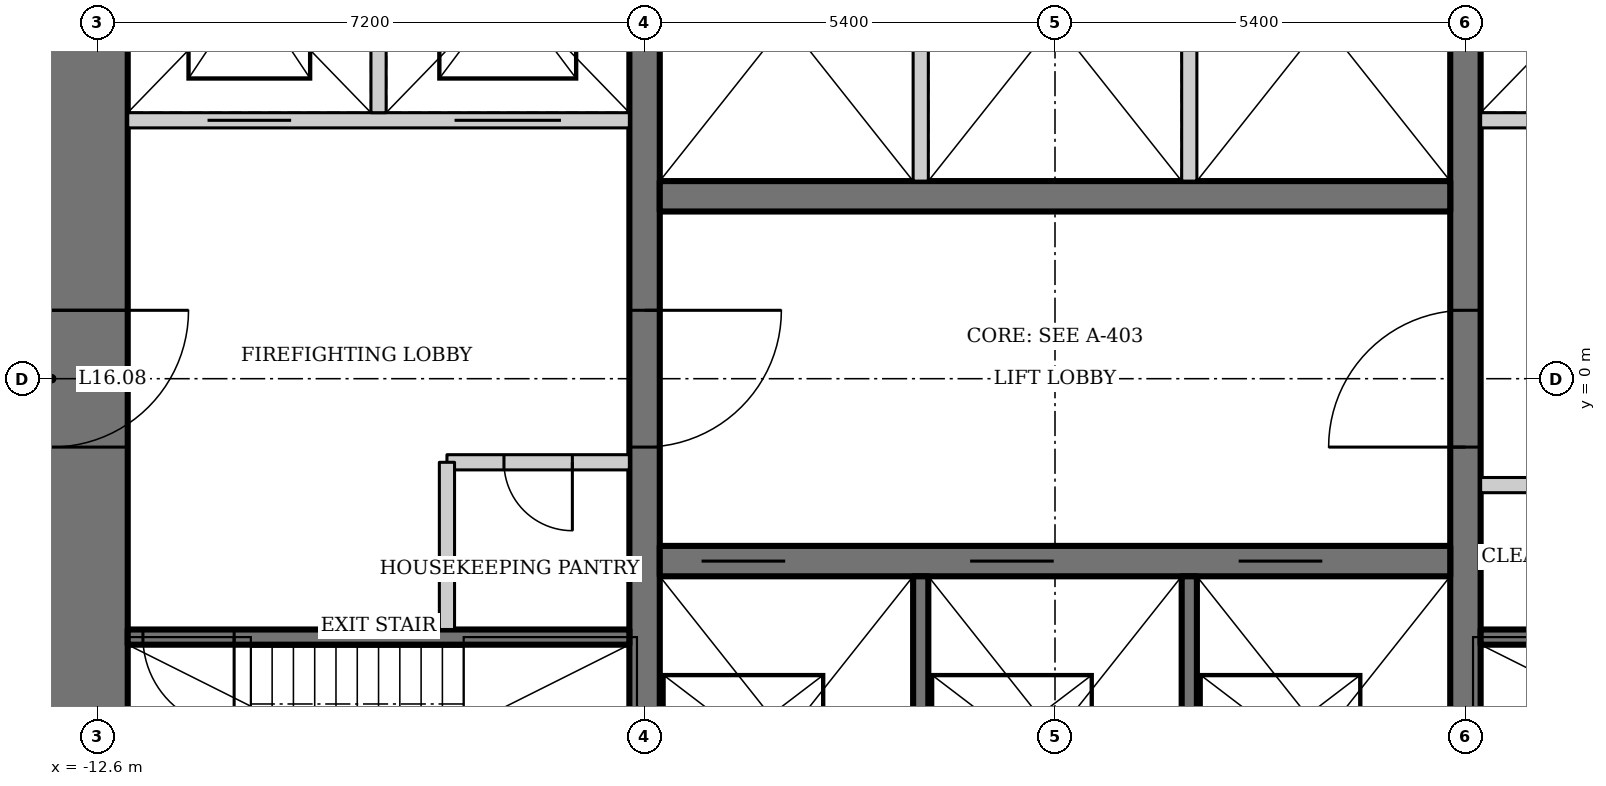
"""IFC4 building model, lengths in metres.
Left out: names, types, materials, properties, quantities, classifications, styles, units other than length and angle.
Written with IfcOpenShell. Run it as: python <this file> out.ifc"""

import sys

from ifc_helpers import new_model, si_unit, direction, frame, frame_2d, origin, place, context, subcontext, project, spatial, rectangle, extrude, element, fill, save


model = new_model("IFC4")
c1 = context("Model", 3, precision=1e-05, world=origin(), true_north=direction((0.0, 1.0)))
c2 = subcontext(c1, "Body", "Model", "MODEL_VIEW")
j1 = project(units=[si_unit("LENGTHUNIT", "METRE"), si_unit("PLANEANGLEUNIT", "RADIAN")], contexts=[c1])
p1 = place(None, origin())
s1 = spatial("IfcSite", under=j1, at=p1, CompositionType="ELEMENT")
p2 = place(p1, origin())
s2 = spatial("IfcBuilding", under=s1, at=p2, CompositionType="ELEMENT")
p3 = place(p2, frame((0.0, 0.0, 73.0)))
s3 = spatial("IfcBuildingStorey", under=s2, at=p3, CompositionType="ELEMENT", Elevation=73.0)
p4 = place(p3, frame((-13.2, 13.0, 0.0), z_axis=(0.0, 0.0, 1.0), x_axis=(0.0, -1.0, 0.0)))
e1 = element("IfcWall", 1, at=p4, inside=s3, PredefinedType="SHEAR", context=c2, shape_type="SweptSolid", body=[
    extrude(rectangle(XDim=26.0, YDim=2.0, at=frame_2d((13.0, 0.0))), origin(), (0.0, 0.0, 1.0), 3.6),
])
p5 = place(p4, frame((12.1, 0.0, 0.0)))
e2 = element("IfcOpeningElement", 2, at=p5, cuts=e1, PredefinedType="OPENING", context=c2, shape_type="SweptSolid", body=[
    extrude(rectangle(XDim=1.8, YDim=2.1, at=frame_2d((0.9, 1.05))), frame((0.0, 1.01, 0.0), z_axis=(0.0, -1.0, 0.0), x_axis=(1.0, 0.0, 0.0)), (0.0, 0.0, 1.0), 2.02),
])
p6 = place(p3, frame((5.4, -6.8, 0.0), z_axis=(0.0, 0.0, 1.0), x_axis=(0.0, 1.0, 0.0)))
e3 = element("IfcWall", 3, at=p6, inside=s3, PredefinedType="SHEAR", context=c2, shape_type="SweptSolid", body=[
    extrude(rectangle(XDim=13.6, YDim=0.4, at=frame_2d((6.8, 0.0))), origin(), (0.0, 0.0, 1.0), 3.6),
])
p7 = place(p6, frame((5.9, 0.0, 0.0)))
e4 = element("IfcOpeningElement", 4, at=p7, cuts=e3, PredefinedType="OPENING", context=c2, shape_type="SweptSolid", body=[
    extrude(rectangle(XDim=1.8, YDim=2.1, at=frame_2d((0.9, 1.05))), frame((0.0, 0.21, 0.0), z_axis=(0.0, -1.0, 0.0), x_axis=(1.0, 0.0, 0.0)), (0.0, 0.0, 1.0), 0.42),
])
p8 = place(p3, frame((-5.4, 6.8, 0.0), z_axis=(0.0, 0.0, 1.0), x_axis=(0.0, -1.0, 0.0)))
e5 = element("IfcWall", 5, at=p8, inside=s3, PredefinedType="SHEAR", context=c2, shape_type="SweptSolid", body=[
    extrude(rectangle(XDim=13.6, YDim=0.4, at=frame_2d((6.8, 0.0))), origin(), (0.0, 0.0, 1.0), 3.6),
])
p9 = place(p8, frame((5.9, 0.0, 0.0)))
e6 = element("IfcOpeningElement", 6, at=p9, cuts=e5, PredefinedType="OPENING", context=c2, shape_type="SweptSolid", body=[
    extrude(rectangle(XDim=1.8, YDim=2.1, at=frame_2d((0.9, 1.05))), frame((0.0, 0.21, 0.0), z_axis=(0.0, -1.0, 0.0), x_axis=(1.0, 0.0, 0.0)), (0.0, 0.0, 1.0), 0.42),
])
p10 = place(p3, frame((-5.2, -2.4, 0.0), z_axis=(0.0, 0.0, 1.0), x_axis=(1.0, 0.0, 0.0)))
e7 = element("IfcWall", 7, at=p10, inside=s3, PredefinedType="SHEAR", context=c2, shape_type="SweptSolid", body=[
    extrude(rectangle(XDim=10.4, YDim=0.4, at=frame_2d((5.2, 0.0))), origin(), (0.0, 0.0, 1.0), 3.6),
])
p11 = place(p10, frame((0.55, 0.0, 0.0)))
e8 = element("IfcOpeningElement", 8, at=p11, cuts=e7, PredefinedType="OPENING", context=c2, shape_type="SweptSolid", body=[
    extrude(rectangle(XDim=1.1, YDim=2.2, at=frame_2d((0.55, 1.1))), frame((0.0, 0.21, 0.0), z_axis=(0.0, -1.0, 0.0), x_axis=(1.0, 0.0, 0.0)), (0.0, 0.0, 1.0), 0.42),
])
p12 = place(p10, frame((4.083, 0.0, 0.0)))
e9 = element("IfcOpeningElement", 9, at=p12, cuts=e7, PredefinedType="OPENING", context=c2, shape_type="SweptSolid", body=[
    extrude(rectangle(XDim=1.1, YDim=2.2, at=frame_2d((0.55, 1.1))), frame((0.0, 0.21, 0.0), z_axis=(0.0, -1.0, 0.0), x_axis=(1.0, 0.0, 0.0)), (0.0, 0.0, 1.0), 0.42),
])
p13 = place(p10, frame((7.617, 0.0, 0.0)))
e10 = element("IfcOpeningElement", 10, at=p13, cuts=e7, PredefinedType="OPENING", context=c2, shape_type="SweptSolid", body=[
    extrude(rectangle(XDim=1.1, YDim=2.2, at=frame_2d((0.55, 1.1))), frame((0.0, 0.21, 0.0), z_axis=(0.0, -1.0, 0.0), x_axis=(1.0, 0.0, 0.0)), (0.0, 0.0, 1.0), 0.42),
])
for number, where, z_axis, x_axis in (
    (11, (-1.767, -2.6, 0.0), (0.0, 0.0, 1.0), (0.0, -1.0, 0.0)),
    (12, (1.767, -2.6, 0.0), (0.0, 0.0, 1.0), (0.0, -1.0, 0.0)),
):
    element("IfcWall", number, at=place(p3, frame(where, z_axis=z_axis, x_axis=x_axis)), inside=s3, PredefinedType="SOLIDWALL", context=c2, shape_type="SweptSolid", body=[
        extrude(rectangle(XDim=4.2, YDim=0.2, at=frame_2d((2.1, 0.0))), origin(), (0.0, 0.0, 1.0), 3.6),
    ])
p14 = place(p3, frame((5.2, 2.4, 0.0), z_axis=(0.0, 0.0, 1.0), x_axis=(-1.0, 0.0, 0.0)))
e13 = element("IfcWall", 13, at=p14, inside=s3, PredefinedType="SHEAR", context=c2, shape_type="SweptSolid", body=[
    extrude(rectangle(XDim=10.4, YDim=0.4, at=frame_2d((5.2, 0.0))), origin(), (0.0, 0.0, 1.0), 3.6),
])
for number, where, z_axis, x_axis in (
    (14, (-1.767, 2.6, 0.0), (0.0, 0.0, 1.0), (0.0, 1.0, 0.0)),
    (15, (1.767, 2.6, 0.0), (0.0, 0.0, 1.0), (0.0, 1.0, 0.0)),
):
    element("IfcWall", number, at=place(p3, frame(where, z_axis=z_axis, x_axis=x_axis)), inside=s3, PredefinedType="SOLIDWALL", context=c2, shape_type="SweptSolid", body=[
        extrude(rectangle(XDim=4.2, YDim=0.2, at=frame_2d((2.1, 0.0))), origin(), (0.0, 0.0, 1.0), 3.6),
    ])
p15 = place(p3, frame((5.6, -3.4, 0.0), z_axis=(0.0, 0.0, 1.0), x_axis=(1.0, 0.0, 0.0)))
e16 = element("IfcWall", 16, at=p15, inside=s3, PredefinedType="SHEAR", context=c2, shape_type="SweptSolid", body=[
    extrude(rectangle(XDim=6.6, YDim=0.2, at=frame_2d((3.3, 0.0))), origin(), (0.0, 0.0, 1.0), 3.6),
])
p16 = place(p15, frame((5.2, 0.0, 0.0)))
e17 = element("IfcOpeningElement", 17, at=p16, cuts=e16, PredefinedType="OPENING", context=c2, shape_type="SweptSolid", body=[
    extrude(rectangle(XDim=1.2, YDim=2.1, at=frame_2d((0.6, 1.05))), frame((0.0, 0.11, 0.0), z_axis=(0.0, -1.0, 0.0), x_axis=(1.0, 0.0, 0.0)), (0.0, 0.0, 1.0), 0.22),
])
p17 = place(p3, frame((12.2, 3.4, 0.0), z_axis=(0.0, 0.0, 1.0), x_axis=(-1.0, 0.0, 0.0)))
e18 = element("IfcWall", 18, at=p17, inside=s3, PredefinedType="SOLIDWALL", context=c2, shape_type="SweptSolid", body=[
    extrude(rectangle(XDim=6.6, YDim=0.2, at=frame_2d((3.3, 0.0))), origin(), (0.0, 0.0, 1.0), 3.6),
])
p18 = place(p17, frame((4.45, 0.0, 0.0)))
e19 = element("IfcOpeningElement", 19, at=p18, cuts=e18, PredefinedType="OPENING", context=c2, shape_type="SweptSolid", body=[
    extrude(rectangle(XDim=1.1, YDim=2.2, at=frame_2d((0.55, 1.1))), frame((0.0, 0.11, 0.0), z_axis=(0.0, -1.0, 0.0), x_axis=(1.0, 0.0, 0.0)), (0.0, 0.0, 1.0), 0.22),
])
p19 = place(p17, frame((0.9, 0.0, 0.0)))
e20 = element("IfcOpeningElement", 20, at=p19, cuts=e18, PredefinedType="OPENING", context=c2, shape_type="SweptSolid", body=[
    extrude(rectangle(XDim=1.4, YDim=2.2, at=frame_2d((0.7, 1.1))), frame((0.0, 0.11, 0.0), z_axis=(0.0, -1.0, 0.0), x_axis=(1.0, 0.0, 0.0)), (0.0, 0.0, 1.0), 0.22),
])
p20 = place(p3, frame((-5.6, -3.4, 0.0), z_axis=(0.0, 0.0, 1.0), x_axis=(-1.0, 0.0, 0.0)))
e21 = element("IfcWall", 21, at=p20, inside=s3, PredefinedType="SHEAR", context=c2, shape_type="SweptSolid", body=[
    extrude(rectangle(XDim=6.6, YDim=0.2, at=frame_2d((3.3, 0.0))), origin(), (0.0, 0.0, 1.0), 3.6),
])
p21 = place(p20, frame((5.2, 0.0, 0.0)))
e22 = element("IfcOpeningElement", 22, at=p21, cuts=e21, PredefinedType="OPENING", context=c2, shape_type="SweptSolid", body=[
    extrude(rectangle(XDim=1.2, YDim=2.1, at=frame_2d((0.6, 1.05))), frame((0.0, 0.11, 0.0), z_axis=(0.0, -1.0, 0.0), x_axis=(1.0, 0.0, 0.0)), (0.0, 0.0, 1.0), 0.22),
])
p22 = place(p3, frame((-12.2, 3.4, 0.0), z_axis=(0.0, 0.0, 1.0), x_axis=(1.0, 0.0, 0.0)))
e23 = element("IfcWall", 23, at=p22, inside=s3, PredefinedType="SOLIDWALL", context=c2, shape_type="SweptSolid", body=[
    extrude(rectangle(XDim=6.6, YDim=0.2, at=frame_2d((3.3, 0.0))), origin(), (0.0, 0.0, 1.0), 3.6),
])
p23 = place(p22, frame((1.05, 0.0, 0.0)))
e24 = element("IfcOpeningElement", 24, at=p23, cuts=e23, PredefinedType="OPENING", context=c2, shape_type="SweptSolid", body=[
    extrude(rectangle(XDim=1.1, YDim=2.2, at=frame_2d((0.55, 1.1))), frame((0.0, 0.11, 0.0), z_axis=(0.0, -1.0, 0.0), x_axis=(1.0, 0.0, 0.0)), (0.0, 0.0, 1.0), 0.22),
])
p24 = place(p22, frame((4.3, 0.0, 0.0)))
e25 = element("IfcOpeningElement", 25, at=p24, cuts=e23, PredefinedType="OPENING", context=c2, shape_type="SweptSolid", body=[
    extrude(rectangle(XDim=1.4, YDim=2.2, at=frame_2d((0.7, 1.1))), frame((0.0, 0.11, 0.0), z_axis=(0.0, -1.0, 0.0), x_axis=(1.0, 0.0, 0.0)), (0.0, 0.0, 1.0), 0.22),
])
p25 = place(p3, frame((-8.9, 3.5, 0.0), z_axis=(0.0, 0.0, 1.0), x_axis=(0.0, 1.0, 0.0)))
e26 = element("IfcWall", 26, at=p25, inside=s3, PredefinedType="SOLIDWALL", context=c2, shape_type="SweptSolid", body=[
    extrude(rectangle(XDim=3.3, YDim=0.2, at=frame_2d((1.65, 0.0))), origin(), (0.0, 0.0, 1.0), 3.6),
])
p26 = place(p3, frame((-5.6, -1.1, 0.0), z_axis=(0.0, 0.0, 1.0), x_axis=(-1.0, 0.0, 0.0)))
e27 = element("IfcWall", 27, at=p26, inside=s3, PredefinedType="SOLIDWALL", context=c2, shape_type="SweptSolid", body=[
    extrude(rectangle(XDim=2.4, YDim=0.2, at=frame_2d((1.2, 0.0))), origin(), (0.0, 0.0, 1.0), 3.45),
])
p27 = place(p26, frame((0.75, 0.0, 0.0)))
e28 = element("IfcOpeningElement", 28, at=p27, cuts=e27, PredefinedType="OPENING", context=c2, shape_type="SweptSolid", body=[
    extrude(rectangle(XDim=0.9, YDim=2.1, at=frame_2d((0.45, 1.05))), frame((0.0, 0.11, 0.0), z_axis=(0.0, -1.0, 0.0), x_axis=(1.0, 0.0, 0.0)), (0.0, 0.0, 1.0), 0.22),
])
p28 = place(p3, frame((-8.0, -1.1, 0.0), z_axis=(0.0, 0.0, 1.0), x_axis=(0.0, -1.0, 0.0)))
e29 = element("IfcWall", 29, at=p28, inside=s3, PredefinedType="SOLIDWALL", context=c2, shape_type="SweptSolid", body=[
    extrude(rectangle(XDim=2.2, YDim=0.2, at=frame_2d((1.1, 0.0))), origin(), (0.0, 0.0, 1.0), 3.45),
])
p29 = place(p3, frame((5.6, -1.4, 0.0), z_axis=(0.0, 0.0, 1.0), x_axis=(1.0, 0.0, 0.0)))
e30 = element("IfcWall", 30, at=p29, inside=s3, PredefinedType="SOLIDWALL", context=c2, shape_type="SweptSolid", body=[
    extrude(rectangle(XDim=2.6, YDim=0.2, at=frame_2d((1.3, 0.0))), origin(), (0.0, 0.0, 1.0), 3.45),
])
p30 = place(p29, frame((0.85, 0.0, 0.0)))
e31 = element("IfcOpeningElement", 31, at=p30, cuts=e30, PredefinedType="OPENING", context=c2, shape_type="SweptSolid", body=[
    extrude(rectangle(XDim=0.9, YDim=2.1, at=frame_2d((0.45, 1.05))), frame((0.0, 0.11, 0.0), z_axis=(0.0, -1.0, 0.0), x_axis=(1.0, 0.0, 0.0)), (0.0, 0.0, 1.0), 0.22),
])
p31 = place(p27, origin())
e32 = element("IfcDoor", 32, at=p31, inside=s3, OperationType="SINGLE_SWING_LEFT", PredefinedType="DOOR", context=c2, shape_type="SweptSolid", body=[
    extrude(rectangle(XDim=0.9, YDim=2.1, at=frame_2d((0.45, 1.05))), frame((0.0, 0.025, 0.0), z_axis=(0.0, -1.0, 0.0), x_axis=(1.0, 0.0, 0.0)), (0.0, 0.0, 1.0), 0.05),
])
fill(e28, e32)
p32 = place(p7, origin())
e33 = element("IfcDoor", 33, at=p32, inside=s3, OperationType="DOUBLE_DOOR_DOUBLE_SWING", PredefinedType="DOOR", context=c2, shape_type="SweptSolid", body=[
    extrude(rectangle(XDim=1.8, YDim=2.1, at=frame_2d((0.9, 1.05))), frame((0.0, 0.025, 0.0), z_axis=(0.0, -1.0, 0.0), x_axis=(1.0, 0.0, 0.0)), (0.0, 0.0, 1.0), 0.05),
])
fill(e4, e33)
p33 = place(p9, origin())
e34 = element("IfcDoor", 34, at=p33, inside=s3, OperationType="DOUBLE_DOOR_DOUBLE_SWING", PredefinedType="DOOR", context=c2, shape_type="SweptSolid", body=[
    extrude(rectangle(XDim=1.8, YDim=2.1, at=frame_2d((0.9, 1.05))), frame((0.0, 0.025, 0.0), z_axis=(0.0, -1.0, 0.0), x_axis=(1.0, 0.0, 0.0)), (0.0, 0.0, 1.0), 0.05),
])
fill(e6, e34)
p34 = place(p21, origin())
e35 = element("IfcDoor", 35, at=p34, inside=s3, OperationType="SINGLE_SWING_RIGHT", PredefinedType="DOOR", context=c2, shape_type="SweptSolid", body=[
    extrude(rectangle(XDim=1.2, YDim=2.1, at=frame_2d((0.6, 1.05))), frame((0.0, 0.025, 0.0), z_axis=(0.0, -1.0, 0.0), x_axis=(1.0, 0.0, 0.0)), (0.0, 0.0, 1.0), 0.05),
])
fill(e22, e35)
p35 = place(p5, origin())
e36 = element("IfcDoor", 36, at=p35, inside=s3, OperationType="DOUBLE_DOOR_DOUBLE_SWING", PredefinedType="DOOR", context=c2, shape_type="SweptSolid", body=[
    extrude(rectangle(XDim=1.8, YDim=2.1, at=frame_2d((0.9, 1.05))), frame((0.0, 0.025, 0.0), z_axis=(0.0, -1.0, 0.0), x_axis=(1.0, 0.0, 0.0)), (0.0, 0.0, 1.0), 0.05),
])
fill(e2, e36)
p36 = place(p11, origin())
e37 = element("IfcDoor", 37, at=p36, inside=s3, OperationType="DOUBLE_DOOR_SLIDING", PredefinedType="DOOR", context=c2, shape_type="SweptSolid", body=[
    extrude(rectangle(XDim=1.1, YDim=2.2, at=frame_2d((0.55, 1.1))), frame((0.0, 0.025, 0.0), z_axis=(0.0, -1.0, 0.0), x_axis=(1.0, 0.0, 0.0)), (0.0, 0.0, 1.0), 0.05),
])
fill(e8, e37)
p37 = place(p12, origin())
e38 = element("IfcDoor", 38, at=p37, inside=s3, OperationType="DOUBLE_DOOR_SLIDING", PredefinedType="DOOR", context=c2, shape_type="SweptSolid", body=[
    extrude(rectangle(XDim=1.1, YDim=2.2, at=frame_2d((0.55, 1.1))), frame((0.0, 0.025, 0.0), z_axis=(0.0, -1.0, 0.0), x_axis=(1.0, 0.0, 0.0)), (0.0, 0.0, 1.0), 0.05),
])
fill(e9, e38)
p38 = place(p13, origin())
e39 = element("IfcDoor", 39, at=p38, inside=s3, OperationType="DOUBLE_DOOR_SLIDING", PredefinedType="DOOR", context=c2, shape_type="SweptSolid", body=[
    extrude(rectangle(XDim=1.1, YDim=2.2, at=frame_2d((0.55, 1.1))), frame((0.0, 0.025, 0.0), z_axis=(0.0, -1.0, 0.0), x_axis=(1.0, 0.0, 0.0)), (0.0, 0.0, 1.0), 0.05),
])
fill(e10, e39)
p39 = place(p23, origin())
e40 = element("IfcDoor", 40, at=p39, inside=s3, OperationType="DOUBLE_DOOR_SLIDING", PredefinedType="DOOR", context=c2, shape_type="SweptSolid", body=[
    extrude(rectangle(XDim=1.1, YDim=2.2, at=frame_2d((0.55, 1.1))), frame((0.0, 0.025, 0.0), z_axis=(0.0, -1.0, 0.0), x_axis=(1.0, 0.0, 0.0)), (0.0, 0.0, 1.0), 0.05),
])
fill(e24, e40)
p40 = place(p24, origin())
e41 = element("IfcDoor", 41, at=p40, inside=s3, OperationType="DOUBLE_DOOR_SLIDING", PredefinedType="DOOR", context=c2, shape_type="SweptSolid", body=[
    extrude(rectangle(XDim=1.4, YDim=2.2, at=frame_2d((0.7, 1.1))), frame((0.0, 0.025, 0.0), z_axis=(0.0, -1.0, 0.0), x_axis=(1.0, 0.0, 0.0)), (0.0, 0.0, 1.0), 0.05),
])
fill(e25, e41)
save(model, sys.argv[1])
